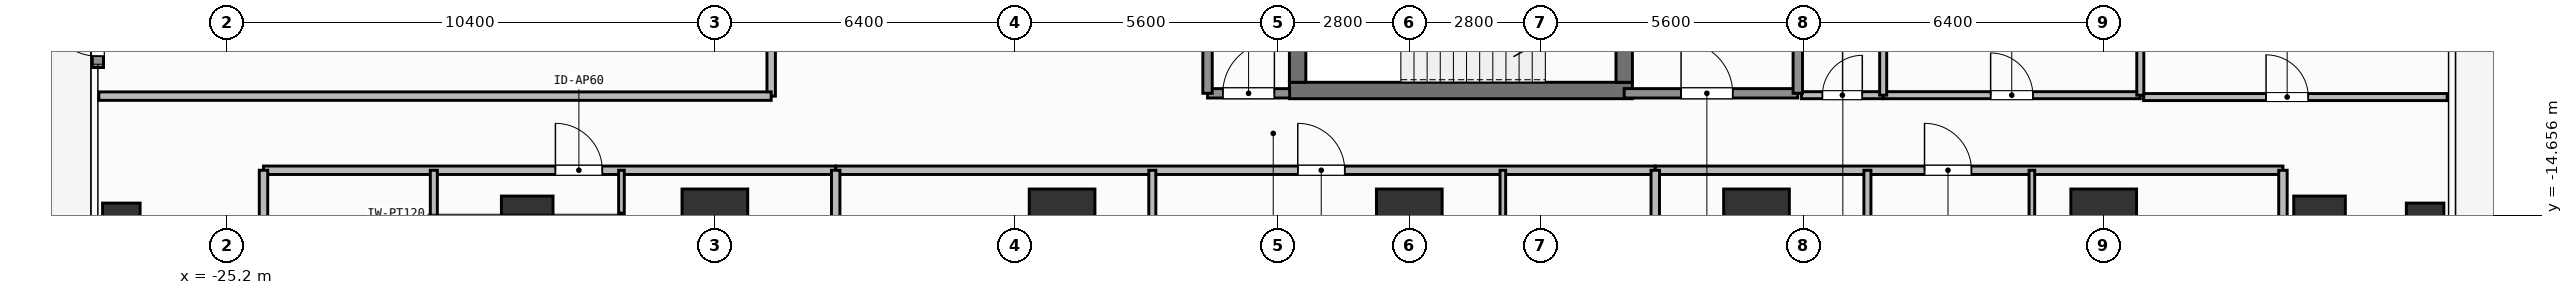
"""IFC4 building model, lengths in metres.
Left out: names, types, materials, properties, quantities, classifications, styles, units other than length and angle.
Written with IfcOpenShell. Run it as: python <this file> out.ifc"""

import sys

from ifc_helpers import new_model, si_unit, direction, frame, frame_2d, origin, origin_2d, place, context, subcontext, project, spatial, rectangle, hollow_rectangle, extrude, element, fill, save


model = new_model("IFC4")
c1 = context("Model", 3, precision=1e-05, world=origin(), true_north=direction((0.0, 1.0)))
c2 = subcontext(c1, "Body", "Model", "MODEL_VIEW")
j1 = project(units=[si_unit("LENGTHUNIT", "METRE"), si_unit("PLANEANGLEUNIT", "RADIAN")], contexts=[c1])
p1 = place(None, origin())
s1 = spatial("IfcSite", under=j1, at=p1, CompositionType="ELEMENT")
p2 = place(p1, origin())
s2 = spatial("IfcBuilding", under=s1, at=p2, CompositionType="ELEMENT")
p3 = place(p2, frame((0.0, 0.0, 61.8)))
s3 = spatial("IfcBuildingStorey", under=s2, at=p3, CompositionType="ELEMENT", Elevation=61.8)
p4 = place(p3, frame((-2.555, -12.0, 0.0), z_axis=(0.0, 0.0, 1.0), x_axis=(1.0, 0.0, 0.0)))
e1 = element("IfcWall", 1, at=p4, inside=s3, PredefinedType="SHEAR", context=c2, shape_type="SweptSolid", body=[
    extrude(rectangle(XDim=7.31, YDim=0.35, at=frame_2d((3.655, 0.0))), origin(), (0.0, 0.0, 1.0), 3.9),
])
p5 = place(p3, frame((-2.38, -11.825, 0.0), z_axis=(0.0, 0.0, 1.0), x_axis=(0.0, 1.0, 0.0)))
e2 = element("IfcWall", 2, at=p5, inside=s3, PredefinedType="SHEAR", context=c2, shape_type="SweptSolid", body=[
    extrude(rectangle(XDim=2.925, YDim=0.35, at=frame_2d((1.462, 0.0))), origin(), (0.0, 0.0, 1.0), 3.9),
])
p6 = place(p3, frame((4.58, -8.9, 0.0), z_axis=(0.0, 0.0, 1.0), x_axis=(0.0, -1.0, 0.0)))
e3 = element("IfcWall", 3, at=p6, inside=s3, PredefinedType="SHEAR", context=c2, shape_type="SweptSolid", body=[
    extrude(rectangle(XDim=2.925, YDim=0.35, at=frame_2d((1.462, 0.0))), origin(), (0.0, 0.0, 1.0), 3.9),
])
p7 = place(p6, frame((0.913, 0.0, 0.0)))
e4 = element("IfcOpeningElement", 4, at=p7, cuts=e3, PredefinedType="OPENING", context=c2, shape_type="SweptSolid", body=[
    extrude(rectangle(XDim=1.1, YDim=2.15, at=frame_2d((0.55, 1.075))), frame((0.0, 0.185, 0.0), z_axis=(0.0, -1.0, 0.0), x_axis=(1.0, 0.0, 0.0)), (0.0, 0.0, 1.0), 0.37),
])
for number, where, z_axis, x_axis in (
    (5, (-14.8, -14.8, 0.0), (0.0, 0.0, 1.0), (1.0, 0.0, 0.0)),
    (6, (-7.4, -14.8, 0.0), (0.0, 0.0, 1.0), (1.0, 0.0, 0.0)),
    (7, (0.0, -14.8, 0.0), (0.0, 0.0, 1.0), (1.0, 0.0, 0.0)),
    (8, (7.4, -14.8, 0.0), (0.0, 0.0, 1.0), (1.0, 0.0, 0.0)),
    (9, (14.8, -14.8, 0.0), (0.0, 0.0, 1.0), (1.0, 0.0, 0.0)),
):
    element("IfcColumn", number, at=place(p3, frame(where, z_axis=z_axis, x_axis=x_axis)), inside=s3, PredefinedType="COLUMN", context=c2, shape_type="SweptSolid", body=[
        extrude(rectangle(XDim=1.4, YDim=1.4, at=origin_2d()), origin(), (0.0, 0.0, 1.0), 3.9),
    ])
for number, where, z_axis, x_axis in (
    (10, (-18.8, -14.8, 0.0), (0.0, 0.0, 1.0), (1.0, 0.0, 0.0)),
    (11, (19.4, -14.8, 0.0), (0.0, 0.0, 1.0), (1.0, 0.0, 0.0)),
):
    element("IfcColumn", number, at=place(p3, frame(where, z_axis=z_axis, x_axis=x_axis)), inside=s3, PredefinedType="COLUMN", context=c2, shape_type="SweptSolid", body=[
        extrude(rectangle(XDim=1.1, YDim=1.1, at=origin_2d()), origin(), (0.0, 0.0, 1.0), 3.9),
    ])
for number, where, z_axis, x_axis in (
    (12, (-27.45, -14.8, 0.0), (0.0, 0.0, 1.0), (1.0, 0.0, 0.0)),
    (13, (21.65, -14.8, 0.0), (0.0, 0.0, 1.0), (1.0, 0.0, 0.0)),
):
    element("IfcColumn", number, at=place(p3, frame(where, z_axis=z_axis, x_axis=x_axis)), inside=s3, PredefinedType="COLUMN", context=c2, shape_type="SweptSolid", body=[
        extrude(hollow_rectangle(XDim=0.8, YDim=0.8, WallThickness=0.036, at=origin_2d()), origin(), (0.0, 0.0, 1.0), 3.9),
    ])
p8 = place(p3, frame((-27.95, -11.51, 0.0), z_axis=(0.0, 0.0, 1.0), x_axis=(0.0, 1.0, 0.0)))
e14 = element("IfcWall", 14, at=p8, inside=s3, PredefinedType="SOLIDWALL", context=c2, shape_type="SweptSolid", body=[
    extrude(rectangle(XDim=1.58, YDim=0.24, at=frame_2d((0.79, 0.0))), origin(), (0.0, 0.0, 1.0), 3.68),
])
p9 = place(p8, frame((0.24, 0.0, 0.0)))
e15 = element("IfcOpeningElement", 15, at=p9, cuts=e14, PredefinedType="OPENING", context=c2, shape_type="SweptSolid", body=[
    extrude(rectangle(XDim=1.1, YDim=2.2, at=frame_2d((0.55, 1.1))), frame((0.0, 0.13, 0.0), z_axis=(0.0, -1.0, 0.0), x_axis=(1.0, 0.0, 0.0)), (0.0, 0.0, 1.0), 0.26),
])
p10 = place(p3, frame((4.58, -12.06, 0.0), z_axis=(0.0, 0.0, 1.0), x_axis=(1.0, 0.0, 0.0)))
e16 = element("IfcWall", 16, at=p10, inside=s3, PredefinedType="SOLIDWALL", context=c2, shape_type="SweptSolid", body=[
    extrude(rectangle(XDim=3.7, YDim=0.2, at=frame_2d((1.85, 0.0))), origin(), (0.0, 0.0, 1.0), 3.68),
])
p11 = place(p10, frame((1.212, 0.0, 0.0)))
e17 = element("IfcOpeningElement", 17, at=p11, cuts=e16, PredefinedType="OPENING", context=c2, shape_type="SweptSolid", body=[
    extrude(rectangle(XDim=1.1, YDim=2.15, at=frame_2d((0.55, 1.075))), frame((0.0, 0.11, 0.0), z_axis=(0.0, -1.0, 0.0), x_axis=(1.0, 0.0, 0.0)), (0.0, 0.0, 1.0), 0.22),
])
p12 = place(p3, frame((-4.3, -12.06, 0.0), z_axis=(0.0, 0.0, 1.0), x_axis=(1.0, 0.0, 0.0)))
e18 = element("IfcWall", 18, at=p12, inside=s3, PredefinedType="SOLIDWALL", context=c2, shape_type="SweptSolid", body=[
    extrude(rectangle(XDim=1.75, YDim=0.2, at=frame_2d((0.875, 0.0))), origin(), (0.0, 0.0, 1.0), 3.68),
])
p13 = place(p12, frame((0.325, 0.0, 0.0)))
e19 = element("IfcOpeningElement", 19, at=p13, cuts=e18, PredefinedType="OPENING", context=c2, shape_type="SweptSolid", body=[
    extrude(rectangle(XDim=1.1, YDim=2.15, at=frame_2d((0.55, 1.075))), frame((0.0, 0.11, 0.0), z_axis=(0.0, -1.0, 0.0), x_axis=(1.0, 0.0, 0.0)), (0.0, 0.0, 1.0), 0.22),
])
p14 = place(p3, frame((8.36, -12.1, 0.0), z_axis=(0.0, 0.0, 1.0), x_axis=(1.0, 0.0, 0.0)))
e20 = element("IfcWall", 20, at=p14, inside=s3, PredefinedType="PARTITIONING", context=c2, shape_type="SweptSolid", body=[
    extrude(rectangle(XDim=1.74, YDim=0.15, at=frame_2d((0.87, 0.0))), origin(), (0.0, 0.0, 1.0), 3.68),
])
p15 = place(p14, frame((0.445, 0.0, 0.0)))
e21 = element("IfcOpeningElement", 21, at=p15, cuts=e20, PredefinedType="OPENING", context=c2, shape_type="SweptSolid", body=[
    extrude(rectangle(XDim=0.85, YDim=2.1, at=frame_2d((0.425, 1.05))), frame((0.0, 0.085, 0.0), z_axis=(0.0, -1.0, 0.0), x_axis=(1.0, 0.0, 0.0)), (0.0, 0.0, 1.0), 0.17),
])
p16 = place(p3, frame((10.1, -12.1, 0.0), z_axis=(0.0, 0.0, 1.0), x_axis=(1.0, 0.0, 0.0)))
e22 = element("IfcWall", 22, at=p16, inside=s3, PredefinedType="PARTITIONING", context=c2, shape_type="SweptSolid", body=[
    extrude(rectangle(XDim=5.48, YDim=0.15, at=frame_2d((2.74, 0.0))), origin(), (0.0, 0.0, 1.0), 3.68),
])
p17 = place(p16, frame((2.29, 0.0, 0.0)))
e23 = element("IfcOpeningElement", 23, at=p17, cuts=e22, PredefinedType="OPENING", context=c2, shape_type="SweptSolid", body=[
    extrude(rectangle(XDim=0.9, YDim=2.1, at=frame_2d((0.45, 1.05))), frame((0.0, 0.085, 0.0), z_axis=(0.0, -1.0, 0.0), x_axis=(1.0, 0.0, 0.0)), (0.0, 0.0, 1.0), 0.17),
])
p18 = place(p3, frame((-24.42, -13.7, 0.0), z_axis=(0.0, 0.0, 1.0), x_axis=(1.0, 0.0, 0.0)))
e24 = element("IfcWall", 24, at=p18, inside=s3, PredefinedType="PARTITIONING", context=c2, shape_type="SweptSolid", body=[
    extrude(rectangle(XDim=12.195, YDim=0.18, at=frame_2d((6.097, 0.0))), origin(), (0.0, 0.0, 1.0), 3.68),
])
p19 = place(p18, frame((6.221, 0.0, 0.0)))
e25 = element("IfcOpeningElement", 25, at=p19, cuts=e24, PredefinedType="OPENING", context=c2, shape_type="SweptSolid", body=[
    extrude(rectangle(XDim=1.0, YDim=2.2, at=frame_2d((0.5, 1.1))), frame((0.0, 0.1, 0.0), z_axis=(0.0, -1.0, 0.0), x_axis=(1.0, 0.0, 0.0)), (0.0, 0.0, 1.0), 0.2),
])
p20 = place(p3, frame((-20.79, -20.79, 0.0), z_axis=(0.0, 0.0, 1.0), x_axis=(0.0, 1.0, 0.0)))
e26 = element("IfcWall", 26, at=p20, inside=s3, PredefinedType="PARTITIONING", context=c2, shape_type="SweptSolid", body=[
    extrude(rectangle(XDim=7.09, YDim=0.15, at=frame_2d((3.545, 0.0))), origin(), (0.0, 0.0, 1.0), 3.68),
])
p21 = place(p20, frame((3.03, 0.0, 0.0)))
e27 = element("IfcOpeningElement", 27, at=p21, cuts=e26, PredefinedType="OPENING", context=c2, shape_type="SweptSolid", body=[
    extrude(rectangle(XDim=0.85, YDim=2.1, at=frame_2d((0.425, 1.05))), frame((0.0, 0.085, 0.0), z_axis=(0.0, -1.0, 0.0), x_axis=(1.0, 0.0, 0.0)), (0.0, 0.0, 1.0), 0.17),
])
p22 = place(p3, frame((-16.791, -17.1, 0.0), z_axis=(0.0, 0.0, 1.0), x_axis=(0.0, 1.0, 0.0)))
e28 = element("IfcWall", 28, at=p22, inside=s3, PredefinedType="PARTITIONING", context=c2, shape_type="SweptSolid", body=[
    extrude(rectangle(XDim=3.4, YDim=0.12, at=frame_2d((1.7, 0.0))), origin(), (0.0, 0.0, 1.0), 3.68),
])
p23 = place(p22, frame((0.675, 0.0, 0.0)))
e29 = element("IfcOpeningElement", 29, at=p23, cuts=e28, PredefinedType="OPENING", context=c2, shape_type="SweptSolid", body=[
    extrude(rectangle(XDim=0.85, YDim=2.1, at=frame_2d((0.425, 1.05))), frame((0.0, 0.07, 0.0), z_axis=(0.0, -1.0, 0.0), x_axis=(1.0, 0.0, 0.0)), (0.0, 0.0, 1.0), 0.14),
])
p24 = place(p3, frame((-12.225, -13.7, 0.0), z_axis=(0.0, 0.0, 1.0), x_axis=(1.0, 0.0, 0.0)))
e30 = element("IfcWall", 30, at=p24, inside=s3, PredefinedType="PARTITIONING", context=c2, shape_type="SweptSolid", body=[
    extrude(rectangle(XDim=17.467, YDim=0.18, at=frame_2d((8.733, 0.0))), origin(), (0.0, 0.0, 1.0), 3.68),
])
p25 = place(p24, frame((9.848, 0.0, 0.0)))
e31 = element("IfcOpeningElement", 31, at=p25, cuts=e30, PredefinedType="OPENING", context=c2, shape_type="SweptSolid", body=[
    extrude(rectangle(XDim=1.0, YDim=2.2, at=frame_2d((0.5, 1.1))), frame((0.0, 0.1, 0.0), z_axis=(0.0, -1.0, 0.0), x_axis=(1.0, 0.0, 0.0)), (0.0, 0.0, 1.0), 0.2),
])
p26 = place(p3, frame((-5.477, -16.678, 0.0), z_axis=(0.0, 0.0, 1.0), x_axis=(0.0, 1.0, 0.0)))
e32 = element("IfcWall", 32, at=p26, inside=s3, PredefinedType="PARTITIONING", context=c2, shape_type="SweptSolid", body=[
    extrude(rectangle(XDim=2.978, YDim=0.15, at=frame_2d((1.489, 0.0))), origin(), (0.0, 0.0, 1.0), 3.68),
])
p27 = place(p3, frame((1.994, -18.096, 0.0), z_axis=(0.0, 0.0, 1.0), x_axis=(0.0, 1.0, 0.0)))
e33 = element("IfcWall", 33, at=p27, inside=s3, PredefinedType="PARTITIONING", context=c2, shape_type="SweptSolid", body=[
    extrude(rectangle(XDim=4.396, YDim=0.12, at=frame_2d((2.198, 0.0))), origin(), (0.0, 0.0, 1.0), 3.68),
])
p28 = place(p27, frame((1.594, 0.0, 0.0)))
e34 = element("IfcOpeningElement", 34, at=p28, cuts=e33, PredefinedType="OPENING", context=c2, shape_type="SweptSolid", body=[
    extrude(rectangle(XDim=0.85, YDim=2.1, at=frame_2d((0.425, 1.05))), frame((0.0, 0.07, 0.0), z_axis=(0.0, -1.0, 0.0), x_axis=(1.0, 0.0, 0.0)), (0.0, 0.0, 1.0), 0.14),
])
p29 = place(p3, frame((5.242, -13.7, 0.0), z_axis=(0.0, 0.0, 1.0), x_axis=(1.0, 0.0, 0.0)))
e35 = element("IfcWall", 35, at=p29, inside=s3, PredefinedType="PARTITIONING", context=c2, shape_type="SweptSolid", body=[
    extrude(rectangle(XDim=13.378, YDim=0.18, at=frame_2d((6.689, 0.0))), origin(), (0.0, 0.0, 1.0), 3.68),
])
p30 = place(p29, frame((5.739, 0.0, 0.0)))
e36 = element("IfcOpeningElement", 36, at=p30, cuts=e35, PredefinedType="OPENING", context=c2, shape_type="SweptSolid", body=[
    extrude(rectangle(XDim=1.0, YDim=2.2, at=frame_2d((0.5, 1.1))), frame((0.0, 0.1, 0.0), z_axis=(0.0, -1.0, 0.0), x_axis=(1.0, 0.0, 0.0)), (0.0, 0.0, 1.0), 0.2),
])
p31 = place(p3, frame((9.764, -20.79, 0.0), z_axis=(0.0, 0.0, 1.0), x_axis=(0.0, 1.0, 0.0)))
e37 = element("IfcWall", 37, at=p31, inside=s3, PredefinedType="PARTITIONING", context=c2, shape_type="SweptSolid", body=[
    extrude(rectangle(XDim=7.09, YDim=0.15, at=frame_2d((3.545, 0.0))), origin(), (0.0, 0.0, 1.0), 3.68),
])
p32 = place(p31, frame((3.03, 0.0, 0.0)))
e38 = element("IfcOpeningElement", 38, at=p32, cuts=e37, PredefinedType="OPENING", context=c2, shape_type="SweptSolid", body=[
    extrude(rectangle(XDim=0.85, YDim=2.1, at=frame_2d((0.425, 1.05))), frame((0.0, 0.085, 0.0), z_axis=(0.0, -1.0, 0.0), x_axis=(1.0, 0.0, 0.0)), (0.0, 0.0, 1.0), 0.17),
])
p33 = place(p3, frame((13.269, -18.663, 0.0), z_axis=(0.0, 0.0, 1.0), x_axis=(0.0, 1.0, 0.0)))
e39 = element("IfcWall", 39, at=p33, inside=s3, PredefinedType="PARTITIONING", context=c2, shape_type="SweptSolid", body=[
    extrude(rectangle(XDim=4.963, YDim=0.12, at=frame_2d((2.481, 0.0))), origin(), (0.0, 0.0, 1.0), 3.68),
])
p34 = place(p33, frame((2.229, 0.0, 0.0)))
e40 = element("IfcOpeningElement", 40, at=p34, cuts=e39, PredefinedType="OPENING", context=c2, shape_type="SweptSolid", body=[
    extrude(rectangle(XDim=0.85, YDim=2.1, at=frame_2d((0.425, 1.05))), frame((0.0, 0.07, 0.0), z_axis=(0.0, -1.0, 0.0), x_axis=(1.0, 0.0, 0.0)), (0.0, 0.0, 1.0), 0.14),
])
p35 = place(p3, frame((-13.6, -12.12, 0.0), z_axis=(0.0, 0.0, 1.0), x_axis=(0.0, 1.0, 0.0)))
e41 = element("IfcWall", 41, at=p35, inside=s3, PredefinedType="PARTITIONING", context=c2, shape_type="SweptSolid", body=[
    extrude(rectangle(XDim=9.389, YDim=0.18, at=frame_2d((4.695, 0.0))), origin(), (0.0, 0.0, 1.0), 3.68),
])
p36 = place(p35, frame((1.415, 0.0, 0.0)))
e42 = element("IfcOpeningElement", 42, at=p36, cuts=e41, PredefinedType="OPENING", context=c2, shape_type="SweptSolid", body=[
    extrude(rectangle(XDim=1.0, YDim=2.2, at=frame_2d((0.5, 1.1))), frame((0.0, 0.1, 0.0), z_axis=(0.0, -1.0, 0.0), x_axis=(1.0, 0.0, 0.0)), (0.0, 0.0, 1.0), 0.2),
])
p37 = place(p3, frame((15.65, -12.14, 0.0), z_axis=(0.0, 0.0, 1.0), x_axis=(1.0, 0.0, 0.0)))
e43 = element("IfcWall", 43, at=p37, inside=s3, PredefinedType="PARTITIONING", context=c2, shape_type="SweptSolid", body=[
    extrude(rectangle(XDim=6.47, YDim=0.15, at=frame_2d((3.235, 0.0))), origin(), (0.0, 0.0, 1.0), 3.68),
])
p38 = place(p37, frame((2.61, 0.0, 0.0)))
e44 = element("IfcOpeningElement", 44, at=p38, cuts=e43, PredefinedType="OPENING", context=c2, shape_type="SweptSolid", body=[
    extrude(rectangle(XDim=0.9, YDim=2.1, at=frame_2d((0.45, 1.05))), frame((0.0, 0.085, 0.0), z_axis=(0.0, -1.0, 0.0), x_axis=(1.0, 0.0, 0.0)), (0.0, 0.0, 1.0), 0.17),
])
for number, where, z_axis, x_axis in (
    (45, (8.28, -12.06, 0.0), (0.0, 0.0, 1.0), (0.0, 1.0, 0.0)),
    (46, (-4.3, -12.06, 0.0), (0.0, 0.0, 1.0), (0.0, 1.0, 0.0)),
):
    element("IfcWall", number, at=place(p3, frame(where, z_axis=z_axis, x_axis=x_axis)), inside=s3, PredefinedType="SOLIDWALL", context=c2, shape_type="SweptSolid", body=[
        extrude(rectangle(XDim=3.11, YDim=0.2, at=frame_2d((1.555, 0.0))), origin(), (0.0, 0.0, 1.0), 3.68),
    ])
p39 = place(p3, frame((10.1, -12.1, 0.0), z_axis=(0.0, 0.0, 1.0), x_axis=(0.0, 1.0, 0.0)))
e47 = element("IfcWall", 47, at=p39, inside=s3, PredefinedType="PARTITIONING", context=c2, shape_type="SweptSolid", body=[
    extrude(rectangle(XDim=2.35, YDim=0.15, at=frame_2d((1.175, 0.0))), origin(), (0.0, 0.0, 1.0), 3.68),
])
p40 = place(p3, frame((15.58, -12.1, 0.0), z_axis=(0.0, 0.0, 1.0), x_axis=(0.0, 1.0, 0.0)))
e48 = element("IfcWall", 48, at=p40, inside=s3, PredefinedType="PARTITIONING", context=c2, shape_type="SweptSolid", body=[
    extrude(rectangle(XDim=6.25, YDim=0.15, at=frame_2d((3.125, 0.0))), origin(), (0.0, 0.0, 1.0), 3.68),
])
for number, where, z_axis, x_axis in (
    (49, (-24.42, -23.91, 0.0), (0.0, 0.0, 1.0), (0.0, 1.0, 0.0)),
    (50, (18.62, -23.91, 0.0), (0.0, 0.0, 1.0), (0.0, 1.0, 0.0)),
):
    element("IfcWall", number, at=place(p3, frame(where, z_axis=z_axis, x_axis=x_axis)), inside=s3, PredefinedType="PARTITIONING", context=c2, shape_type="SweptSolid", body=[
        extrude(rectangle(XDim=10.21, YDim=0.18, at=frame_2d((5.105, 0.0))), origin(), (0.0, 0.0, 1.0), 3.68),
    ])
for number, where, z_axis, x_axis in (
    (51, (-12.225, -25.03, 0.0), (0.0, 0.0, 1.0), (0.0, 1.0, 0.0)),
    (52, (5.242, -25.03, 0.0), (0.0, 0.0, 1.0), (0.0, 1.0, 0.0)),
):
    element("IfcWall", number, at=place(p3, frame(where, z_axis=z_axis, x_axis=x_axis)), inside=s3, PredefinedType="PARTITIONING", context=c2, shape_type="SweptSolid", body=[
        extrude(rectangle(XDim=11.33, YDim=0.18, at=frame_2d((5.665, 0.0))), origin(), (0.0, 0.0, 1.0), 3.68),
    ])
p41 = place(p3, frame((-27.93, -12.12, 0.0), z_axis=(0.0, 0.0, 1.0), x_axis=(1.0, 0.0, 0.0)))
e53 = element("IfcWall", 53, at=p41, inside=s3, PredefinedType="PARTITIONING", context=c2, shape_type="SweptSolid", body=[
    extrude(rectangle(XDim=14.33, YDim=0.18, at=frame_2d((7.165, 0.0))), origin(), (0.0, 0.0, 1.0), 3.68),
])
p42 = place(p9, origin())
e54 = element("IfcDoor", 54, at=p42, inside=s3, OperationType="SINGLE_SWING_RIGHT", PredefinedType="DOOR", context=c2, shape_type="SweptSolid", body=[
    extrude(rectangle(XDim=1.1, YDim=2.2, at=frame_2d((0.55, 1.1))), frame((0.0, 0.025, 0.0), z_axis=(0.0, -1.0, 0.0), x_axis=(1.0, 0.0, 0.0)), (0.0, 0.0, 1.0), 0.05),
])
fill(e15, e54)
p43 = place(p11, origin())
e55 = element("IfcDoor", 55, at=p43, inside=s3, OperationType="SINGLE_SWING_LEFT", PredefinedType="DOOR", context=c2, shape_type="SweptSolid", body=[
    extrude(rectangle(XDim=1.1, YDim=2.15, at=frame_2d((0.55, 1.075))), frame((0.0, 0.025, 0.0), z_axis=(0.0, -1.0, 0.0), x_axis=(1.0, 0.0, 0.0)), (0.0, 0.0, 1.0), 0.05),
])
fill(e17, e55)
p44 = place(p13, origin())
e56 = element("IfcDoor", 56, at=p44, inside=s3, OperationType="SINGLE_SWING_RIGHT", PredefinedType="DOOR", context=c2, shape_type="SweptSolid", body=[
    extrude(rectangle(XDim=1.1, YDim=2.15, at=frame_2d((0.55, 1.075))), frame((0.0, 0.025, 0.0), z_axis=(0.0, -1.0, 0.0), x_axis=(1.0, 0.0, 0.0)), (0.0, 0.0, 1.0), 0.05),
])
fill(e19, e56)
p45 = place(p15, origin())
e57 = element("IfcDoor", 57, at=p45, inside=s3, OperationType="SINGLE_SWING_RIGHT", PredefinedType="DOOR", context=c2, shape_type="SweptSolid", body=[
    extrude(rectangle(XDim=0.85, YDim=2.1, at=frame_2d((0.425, 1.05))), frame((0.0, 0.025, 0.0), z_axis=(0.0, -1.0, 0.0), x_axis=(1.0, 0.0, 0.0)), (0.0, 0.0, 1.0), 0.05),
])
fill(e21, e57)
p46 = place(p17, origin())
e58 = element("IfcDoor", 58, at=p46, inside=s3, OperationType="SINGLE_SWING_LEFT", PredefinedType="DOOR", context=c2, shape_type="SweptSolid", body=[
    extrude(rectangle(XDim=0.9, YDim=2.1, at=frame_2d((0.45, 1.05))), frame((0.0, 0.025, 0.0), z_axis=(0.0, -1.0, 0.0), x_axis=(1.0, 0.0, 0.0)), (0.0, 0.0, 1.0), 0.05),
])
fill(e23, e58)
p47 = place(p19, origin())
e59 = element("IfcDoor", 59, at=p47, inside=s3, OperationType="SINGLE_SWING_LEFT", PredefinedType="DOOR", context=c2, shape_type="SweptSolid", body=[
    extrude(rectangle(XDim=1.0, YDim=2.2, at=frame_2d((0.5, 1.1))), frame((0.0, 0.025, 0.0), z_axis=(0.0, -1.0, 0.0), x_axis=(1.0, 0.0, 0.0)), (0.0, 0.0, 1.0), 0.05),
])
fill(e25, e59)
p48 = place(p25, origin())
e60 = element("IfcDoor", 60, at=p48, inside=s3, OperationType="SINGLE_SWING_LEFT", PredefinedType="DOOR", context=c2, shape_type="SweptSolid", body=[
    extrude(rectangle(XDim=1.0, YDim=2.2, at=frame_2d((0.5, 1.1))), frame((0.0, 0.025, 0.0), z_axis=(0.0, -1.0, 0.0), x_axis=(1.0, 0.0, 0.0)), (0.0, 0.0, 1.0), 0.05),
])
fill(e31, e60)
p49 = place(p30, origin())
e61 = element("IfcDoor", 61, at=p49, inside=s3, OperationType="SINGLE_SWING_LEFT", PredefinedType="DOOR", context=c2, shape_type="SweptSolid", body=[
    extrude(rectangle(XDim=1.0, YDim=2.2, at=frame_2d((0.5, 1.1))), frame((0.0, 0.025, 0.0), z_axis=(0.0, -1.0, 0.0), x_axis=(1.0, 0.0, 0.0)), (0.0, 0.0, 1.0), 0.05),
])
fill(e36, e61)
p50 = place(p38, origin())
e62 = element("IfcDoor", 62, at=p50, inside=s3, OperationType="SINGLE_SWING_LEFT", PredefinedType="DOOR", context=c2, shape_type="SweptSolid", body=[
    extrude(rectangle(XDim=0.9, YDim=2.1, at=frame_2d((0.45, 1.05))), frame((0.0, 0.025, 0.0), z_axis=(0.0, -1.0, 0.0), x_axis=(1.0, 0.0, 0.0)), (0.0, 0.0, 1.0), 0.05),
])
fill(e44, e62)
save(model, sys.argv[1])
